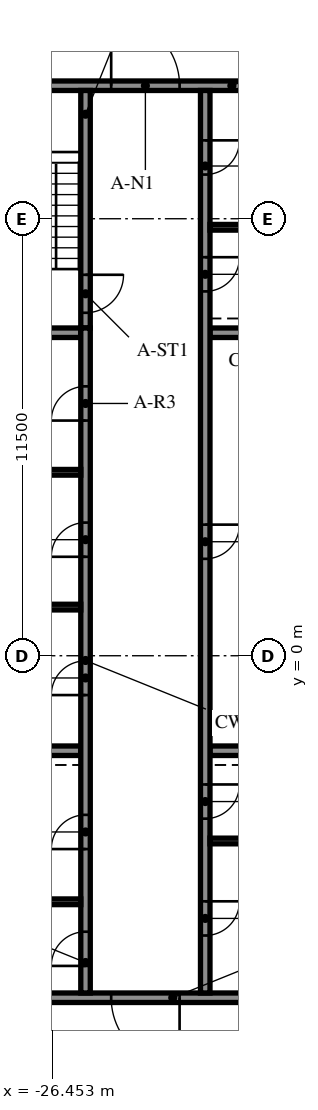
"""IFC4 building model, lengths in metres.
Left out: names, types, materials, properties, quantities, classifications, styles, units other than length and angle.
Written with IfcOpenShell. Run it as: python <this file> out.ifc"""

import sys

from ifc_helpers import new_model, si_unit, direction, frame, frame_2d, origin, place, context, subcontext, project, spatial, rectangle, extrude, element, fill, save


model = new_model("IFC4")
c1 = context("Model", 3, precision=1e-05, world=origin(), true_north=direction((0.0, 1.0)))
c2 = subcontext(c1, "Body", "Model", "MODEL_VIEW")
j1 = project(units=[si_unit("LENGTHUNIT", "METRE"), si_unit("PLANEANGLEUNIT", "RADIAN")], contexts=[c1])
p1 = place(None, origin())
s1 = spatial("IfcSite", under=j1, at=p1, CompositionType="ELEMENT")
p2 = place(p1, origin())
s2 = spatial("IfcBuilding", under=s1, at=p2, CompositionType="ELEMENT")
p3 = place(p2, frame((0.0, 0.0, 240.0)))
s3 = spatial("IfcBuildingStorey", under=s2, at=p3, CompositionType="ELEMENT", Elevation=240.0)
p4 = place(p3, frame((-19.45, -9.0, 0.0), z_axis=(0.0, 0.0, 1.0), x_axis=(-1.0, 0.0, 0.0)))
e1 = element("IfcWall", 1, at=p4, inside=s3, PredefinedType="SOLIDWALL", context=c2, shape_type="SweptSolid", body=[
    extrude(rectangle(XDim=9.1, YDim=0.25, at=frame_2d((4.55, 0.0))), origin(), (0.0, 0.0, 1.0), 3.46),
])
p5 = place(p4, frame((3.65, 0.0, 0.0)))
e2 = element("IfcOpeningElement", 2, at=p5, cuts=e1, PredefinedType="OPENING", context=c2, shape_type="SweptSolid", body=[
    extrude(rectangle(XDim=1.8, YDim=2.1, at=frame_2d((0.9, 1.05))), frame((0.0, 0.135, 0.0), z_axis=(0.0, -1.0, 0.0), x_axis=(1.0, 0.0, 0.0)), (0.0, 0.0, 1.0), 0.27),
])
p6 = place(p3, frame((-28.55, 15.0, 0.0), z_axis=(0.0, 0.0, 1.0), x_axis=(1.0, 0.0, 0.0)))
e3 = element("IfcWall", 3, at=p6, inside=s3, PredefinedType="SOLIDWALL", context=c2, shape_type="SweptSolid", body=[
    extrude(rectangle(XDim=9.1, YDim=0.25, at=frame_2d((4.55, 0.0))), origin(), (0.0, 0.0, 1.0), 3.46),
])
p7 = place(p6, frame((3.65, 0.0, 0.0)))
e4 = element("IfcOpeningElement", 4, at=p7, cuts=e3, PredefinedType="OPENING", context=c2, shape_type="SweptSolid", body=[
    extrude(rectangle(XDim=1.8, YDim=2.1, at=frame_2d((0.9, 1.05))), frame((0.0, 0.135, 0.0), z_axis=(0.0, -1.0, 0.0), x_axis=(1.0, 0.0, 0.0)), (0.0, 0.0, 1.0), 0.27),
])
p8 = place(p3, frame((-25.575, -8.875, 0.0), z_axis=(0.0, 0.0, 1.0), x_axis=(0.0, 1.0, 0.0)))
e5 = element("IfcWall", 5, at=p8, inside=s3, PredefinedType="SOLIDWALL", context=c2, shape_type="SweptSolid", body=[
    extrude(rectangle(XDim=17.5, YDim=0.25, at=frame_2d((8.75, 0.0))), origin(), (0.0, 0.0, 1.0), 3.46),
])
p9 = place(p8, frame((7.84, 0.0, 0.0)))
e6 = element("IfcOpeningElement", 6, at=p9, cuts=e5, PredefinedType="OPENING", context=c2, shape_type="SweptSolid", body=[
    extrude(rectangle(XDim=0.9, YDim=2.1, at=frame_2d((0.45, 1.05))), frame((0.0, 0.135, 0.0), z_axis=(0.0, -1.0, 0.0), x_axis=(1.0, 0.0, 0.0)), (0.0, 0.0, 1.0), 0.27),
])
p10 = place(p8, frame((11.479, 0.0, 0.0)))
e7 = element("IfcOpeningElement", 7, at=p10, cuts=e5, PredefinedType="OPENING", context=c2, shape_type="SweptSolid", body=[
    extrude(rectangle(XDim=0.9, YDim=2.1, at=frame_2d((0.45, 1.05))), frame((0.0, 0.135, 0.0), z_axis=(0.0, -1.0, 0.0), x_axis=(1.0, 0.0, 0.0)), (0.0, 0.0, 1.0), 0.27),
])
p11 = place(p8, frame((15.064, 0.0, 0.0)))
e8 = element("IfcOpeningElement", 8, at=p11, cuts=e5, PredefinedType="OPENING", context=c2, shape_type="SweptSolid", body=[
    extrude(rectangle(XDim=0.9, YDim=2.1, at=frame_2d((0.45, 1.05))), frame((0.0, 0.135, 0.0), z_axis=(0.0, -1.0, 0.0), x_axis=(1.0, 0.0, 0.0)), (0.0, 0.0, 1.0), 0.27),
])
p12 = place(p8, frame((0.712, 0.0, 0.0)))
e9 = element("IfcOpeningElement", 9, at=p12, cuts=e5, PredefinedType="OPENING", context=c2, shape_type="SweptSolid", body=[
    extrude(rectangle(XDim=0.9, YDim=2.1, at=frame_2d((0.45, 1.05))), frame((0.0, 0.135, 0.0), z_axis=(0.0, -1.0, 0.0), x_axis=(1.0, 0.0, 0.0)), (0.0, 0.0, 1.0), 0.27),
])
p13 = place(p8, frame((3.788, 0.0, 0.0)))
e10 = element("IfcOpeningElement", 10, at=p13, cuts=e5, PredefinedType="OPENING", context=c2, shape_type="SweptSolid", body=[
    extrude(rectangle(XDim=0.9, YDim=2.1, at=frame_2d((0.45, 1.05))), frame((0.0, 0.135, 0.0), z_axis=(0.0, -1.0, 0.0), x_axis=(1.0, 0.0, 0.0)), (0.0, 0.0, 1.0), 0.27),
])
p14 = place(p3, frame((-25.575, 14.875, 0.0), z_axis=(0.0, 0.0, 1.0), x_axis=(0.0, -1.0, 0.0)))
e11 = element("IfcWall", 11, at=p14, inside=s3, PredefinedType="SOLIDWALL", context=c2, shape_type="SweptSolid", body=[
    extrude(rectangle(XDim=6.25, YDim=0.25, at=frame_2d((3.125, 0.0))), origin(), (0.0, 0.0, 1.0), 3.46),
])
p15 = place(p14, frame((4.85, 0.0, 0.0)))
e12 = element("IfcOpeningElement", 12, at=p15, cuts=e11, PredefinedType="OPENING", context=c2, shape_type="SweptSolid", body=[
    extrude(rectangle(XDim=1.0, YDim=2.1, at=frame_2d((0.5, 1.05))), frame((0.0, 0.135, 0.0), z_axis=(0.0, -1.0, 0.0), x_axis=(1.0, 0.0, 0.0)), (0.0, 0.0, 1.0), 0.27),
])
p16 = place(p3, frame((-22.425, 14.875, 0.0), z_axis=(0.0, 0.0, 1.0), x_axis=(0.0, -1.0, 0.0)))
e13 = element("IfcWall", 13, at=p16, inside=s3, PredefinedType="SOLIDWALL", context=c2, shape_type="SweptSolid", body=[
    extrude(rectangle(XDim=23.75, YDim=0.25, at=frame_2d((11.875, 0.0))), origin(), (0.0, 0.0, 1.0), 3.46),
])
p17 = place(p16, frame((11.425, 0.0, 0.0)))
e14 = element("IfcOpeningElement", 14, at=p17, cuts=e13, PredefinedType="OPENING", context=c2, shape_type="SweptSolid", body=[
    extrude(rectangle(XDim=0.9, YDim=2.1, at=frame_2d((0.45, 1.05))), frame((0.0, 0.135, 0.0), z_axis=(0.0, -1.0, 0.0), x_axis=(1.0, 0.0, 0.0)), (0.0, 0.0, 1.0), 0.27),
])
p18 = place(p16, frame((21.337, 0.0, 0.0)))
e15 = element("IfcOpeningElement", 15, at=p18, cuts=e13, PredefinedType="OPENING", context=c2, shape_type="SweptSolid", body=[
    extrude(rectangle(XDim=0.9, YDim=2.1, at=frame_2d((0.45, 1.05))), frame((0.0, 0.135, 0.0), z_axis=(0.0, -1.0, 0.0), x_axis=(1.0, 0.0, 0.0)), (0.0, 0.0, 1.0), 0.27),
])
p19 = place(p16, frame((18.262, 0.0, 0.0)))
e16 = element("IfcOpeningElement", 16, at=p19, cuts=e13, PredefinedType="OPENING", context=c2, shape_type="SweptSolid", body=[
    extrude(rectangle(XDim=0.9, YDim=2.1, at=frame_2d((0.45, 1.05))), frame((0.0, 0.135, 0.0), z_axis=(0.0, -1.0, 0.0), x_axis=(1.0, 0.0, 0.0)), (0.0, 0.0, 1.0), 0.27),
])
p20 = place(p16, frame((4.387, 0.0, 0.0)))
e17 = element("IfcOpeningElement", 17, at=p20, cuts=e13, PredefinedType="OPENING", context=c2, shape_type="SweptSolid", body=[
    extrude(rectangle(XDim=0.9, YDim=2.1, at=frame_2d((0.45, 1.05))), frame((0.0, 0.135, 0.0), z_axis=(0.0, -1.0, 0.0), x_axis=(1.0, 0.0, 0.0)), (0.0, 0.0, 1.0), 0.27),
])
p21 = place(p16, frame((1.312, 0.0, 0.0)))
e18 = element("IfcOpeningElement", 18, at=p21, cuts=e13, PredefinedType="OPENING", context=c2, shape_type="SweptSolid", body=[
    extrude(rectangle(XDim=0.9, YDim=2.1, at=frame_2d((0.45, 1.05))), frame((0.0, 0.135, 0.0), z_axis=(0.0, -1.0, 0.0), x_axis=(1.0, 0.0, 0.0)), (0.0, 0.0, 1.0), 0.27),
])
for number, where, z_axis, x_axis in (
    (19, (-28.55, -2.5, 0.0), (0.0, 0.0, 1.0), (1.0, 0.0, 0.0)),
    (20, (-28.55, 8.5, 0.0), (0.0, 0.0, 1.0), (1.0, 0.0, 0.0)),
    (21, (-22.3, -2.5, 0.0), (0.0, 0.0, 1.0), (1.0, 0.0, 0.0)),
    (22, (-22.3, 8.5, 0.0), (0.0, 0.0, 1.0), (1.0, 0.0, 0.0)),
):
    element("IfcWall", number, at=place(p3, frame(where, z_axis=z_axis, x_axis=x_axis)), inside=s3, PredefinedType="SOLIDWALL", context=c2, shape_type="SweptSolid", body=[
        extrude(rectangle(XDim=2.85, YDim=0.25, at=frame_2d((1.425, 0.0))), origin(), (0.0, 0.0, 1.0), 3.46),
    ])
for number, where, z_axis, x_axis in (
    (23, (-28.55, 1.28, 0.0), (0.0, 0.0, 1.0), (1.0, 0.0, 0.0)),
    (24, (-28.55, 4.827, 0.0), (0.0, 0.0, 1.0), (1.0, 0.0, 0.0)),
    (25, (-28.55, -6.475, 0.0), (0.0, 0.0, 1.0), (1.0, 0.0, 0.0)),
    (26, (-22.3, -4.875, 0.0), (0.0, 0.0, 1.0), (1.0, 0.0, 0.0)),
    (27, (-22.3, 11.275, 0.0), (0.0, 0.0, 1.0), (1.0, 0.0, 0.0)),
):
    element("IfcWall", number, at=place(p3, frame(where, z_axis=z_axis, x_axis=x_axis)), inside=s3, PredefinedType="PARTITIONING", context=c2, shape_type="SweptSolid", body=[
        extrude(rectangle(XDim=2.85, YDim=0.15, at=frame_2d((1.425, 0.0))), origin(), (0.0, 0.0, 1.0), 3.46),
    ])
p22 = place(p5, origin())
e28 = element("IfcDoor", 28, at=p22, inside=s3, OperationType="DOUBLE_DOOR_SINGLE_SWING", PredefinedType="DOOR", context=c2, shape_type="SweptSolid", body=[
    extrude(rectangle(XDim=1.8, YDim=2.1, at=frame_2d((0.9, 1.05))), frame((0.0, 0.025, 0.0), z_axis=(0.0, -1.0, 0.0), x_axis=(1.0, 0.0, 0.0)), (0.0, 0.0, 1.0), 0.05),
])
fill(e2, e28)
p23 = place(p7, origin())
e29 = element("IfcDoor", 29, at=p23, inside=s3, OperationType="DOUBLE_DOOR_SINGLE_SWING", PredefinedType="DOOR", context=c2, shape_type="SweptSolid", body=[
    extrude(rectangle(XDim=1.8, YDim=2.1, at=frame_2d((0.9, 1.05))), frame((0.0, 0.025, 0.0), z_axis=(0.0, -1.0, 0.0), x_axis=(1.0, 0.0, 0.0)), (0.0, 0.0, 1.0), 0.05),
])
fill(e4, e29)
p24 = place(p9, origin())
e30 = element("IfcDoor", 30, at=p24, inside=s3, OperationType="SINGLE_SWING_LEFT", PredefinedType="DOOR", context=c2, shape_type="SweptSolid", body=[
    extrude(rectangle(XDim=0.9, YDim=2.1, at=frame_2d((0.45, 1.05))), frame((0.0, 0.025, 0.0), z_axis=(0.0, -1.0, 0.0), x_axis=(1.0, 0.0, 0.0)), (0.0, 0.0, 1.0), 0.05),
])
fill(e6, e30)
p25 = place(p10, origin())
e31 = element("IfcDoor", 31, at=p25, inside=s3, OperationType="SINGLE_SWING_RIGHT", PredefinedType="DOOR", context=c2, shape_type="SweptSolid", body=[
    extrude(rectangle(XDim=0.9, YDim=2.1, at=frame_2d((0.45, 1.05))), frame((0.0, 0.025, 0.0), z_axis=(0.0, -1.0, 0.0), x_axis=(1.0, 0.0, 0.0)), (0.0, 0.0, 1.0), 0.05),
])
fill(e7, e31)
p26 = place(p11, origin())
e32 = element("IfcDoor", 32, at=p26, inside=s3, OperationType="SINGLE_SWING_LEFT", PredefinedType="DOOR", context=c2, shape_type="SweptSolid", body=[
    extrude(rectangle(XDim=0.9, YDim=2.1, at=frame_2d((0.45, 1.05))), frame((0.0, 0.025, 0.0), z_axis=(0.0, -1.0, 0.0), x_axis=(1.0, 0.0, 0.0)), (0.0, 0.0, 1.0), 0.05),
])
fill(e8, e32)
p27 = place(p17, origin())
e33 = element("IfcDoor", 33, at=p27, inside=s3, OperationType="SINGLE_SWING_RIGHT", PredefinedType="DOOR", context=c2, shape_type="SweptSolid", body=[
    extrude(rectangle(XDim=0.9, YDim=2.1, at=frame_2d((0.45, 1.05))), frame((0.0, 0.025, 0.0), z_axis=(0.0, -1.0, 0.0), x_axis=(1.0, 0.0, 0.0)), (0.0, 0.0, 1.0), 0.05),
])
fill(e14, e33)
p28 = place(p12, origin())
e34 = element("IfcDoor", 34, at=p28, inside=s3, OperationType="SINGLE_SWING_LEFT", PredefinedType="DOOR", context=c2, shape_type="SweptSolid", body=[
    extrude(rectangle(XDim=0.9, YDim=2.1, at=frame_2d((0.45, 1.05))), frame((0.0, 0.025, 0.0), z_axis=(0.0, -1.0, 0.0), x_axis=(1.0, 0.0, 0.0)), (0.0, 0.0, 1.0), 0.05),
])
fill(e9, e34)
p29 = place(p13, origin())
e35 = element("IfcDoor", 35, at=p29, inside=s3, OperationType="SINGLE_SWING_RIGHT", PredefinedType="DOOR", context=c2, shape_type="SweptSolid", body=[
    extrude(rectangle(XDim=0.9, YDim=2.1, at=frame_2d((0.45, 1.05))), frame((0.0, 0.025, 0.0), z_axis=(0.0, -1.0, 0.0), x_axis=(1.0, 0.0, 0.0)), (0.0, 0.0, 1.0), 0.05),
])
fill(e10, e35)
p30 = place(p18, origin())
e36 = element("IfcDoor", 36, at=p30, inside=s3, OperationType="SINGLE_SWING_LEFT", PredefinedType="DOOR", context=c2, shape_type="SweptSolid", body=[
    extrude(rectangle(XDim=0.9, YDim=2.1, at=frame_2d((0.45, 1.05))), frame((0.0, 0.025, 0.0), z_axis=(0.0, -1.0, 0.0), x_axis=(1.0, 0.0, 0.0)), (0.0, 0.0, 1.0), 0.05),
])
fill(e15, e36)
p31 = place(p19, origin())
e37 = element("IfcDoor", 37, at=p31, inside=s3, OperationType="SINGLE_SWING_RIGHT", PredefinedType="DOOR", context=c2, shape_type="SweptSolid", body=[
    extrude(rectangle(XDim=0.9, YDim=2.1, at=frame_2d((0.45, 1.05))), frame((0.0, 0.025, 0.0), z_axis=(0.0, -1.0, 0.0), x_axis=(1.0, 0.0, 0.0)), (0.0, 0.0, 1.0), 0.05),
])
fill(e16, e37)
p32 = place(p20, origin())
e38 = element("IfcDoor", 38, at=p32, inside=s3, OperationType="SINGLE_SWING_LEFT", PredefinedType="DOOR", context=c2, shape_type="SweptSolid", body=[
    extrude(rectangle(XDim=0.9, YDim=2.1, at=frame_2d((0.45, 1.05))), frame((0.0, 0.025, 0.0), z_axis=(0.0, -1.0, 0.0), x_axis=(1.0, 0.0, 0.0)), (0.0, 0.0, 1.0), 0.05),
])
fill(e17, e38)
p33 = place(p21, origin())
e39 = element("IfcDoor", 39, at=p33, inside=s3, OperationType="SINGLE_SWING_RIGHT", PredefinedType="DOOR", context=c2, shape_type="SweptSolid", body=[
    extrude(rectangle(XDim=0.9, YDim=2.1, at=frame_2d((0.45, 1.05))), frame((0.0, 0.025, 0.0), z_axis=(0.0, -1.0, 0.0), x_axis=(1.0, 0.0, 0.0)), (0.0, 0.0, 1.0), 0.05),
])
fill(e18, e39)
p34 = place(p15, origin())
e40 = element("IfcDoor", 40, at=p34, inside=s3, OperationType="SINGLE_SWING_LEFT", PredefinedType="DOOR", context=c2, shape_type="SweptSolid", body=[
    extrude(rectangle(XDim=1.0, YDim=2.1, at=frame_2d((0.5, 1.05))), frame((0.0, 0.025, 0.0), z_axis=(0.0, -1.0, 0.0), x_axis=(1.0, 0.0, 0.0)), (0.0, 0.0, 1.0), 0.05),
])
fill(e12, e40)
save(model, sys.argv[1])
